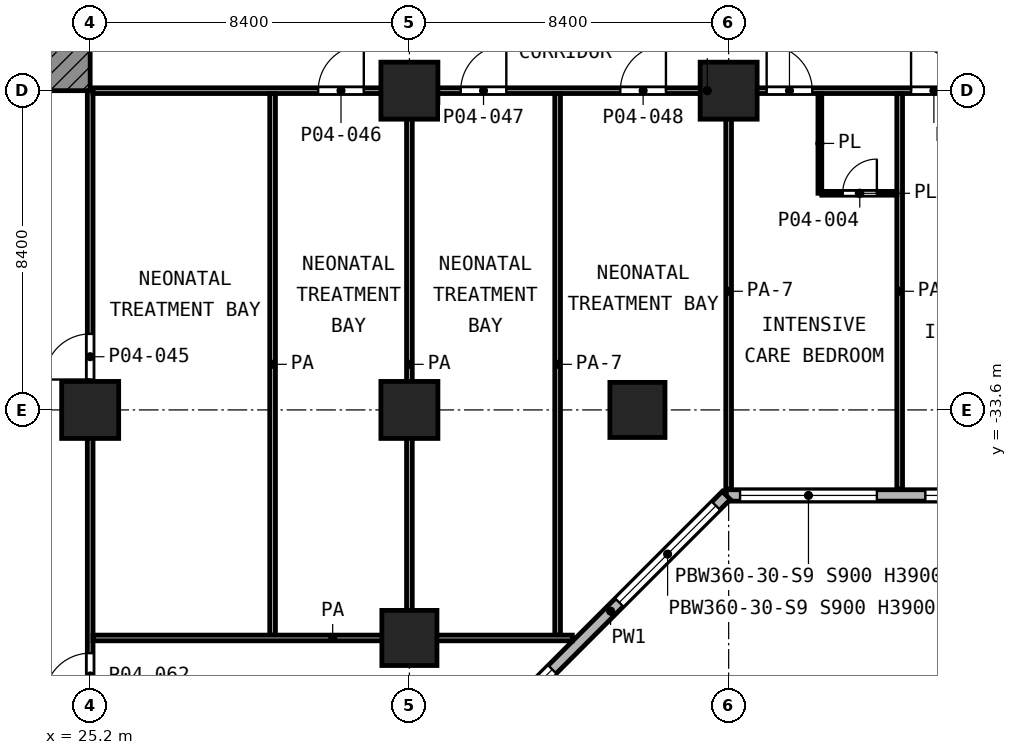
"""IFC4 building model, lengths in metres.
Left out: names, types, materials, properties, quantities, classifications, styles, units other than length and angle.
Written with IfcOpenShell. Run it as: python <this file> out.ifc"""

import sys

from ifc_helpers import new_model, si_unit, direction, frame, frame_2d, origin, origin_2d, place, context, subcontext, project, spatial, rectangle, extrude, element, fill, save


model = new_model("IFC4")
c1 = context("Model", 3, precision=1e-05, world=origin(), true_north=direction((0.0, 1.0)))
c2 = subcontext(c1, "Body", "Model", "MODEL_VIEW")
j1 = project(units=[si_unit("LENGTHUNIT", "METRE"), si_unit("PLANEANGLEUNIT", "RADIAN")], contexts=[c1])
p1 = place(None, origin())
s1 = spatial("IfcSite", under=j1, at=p1, CompositionType="ELEMENT")
p2 = place(p1, origin())
s2 = spatial("IfcBuilding", under=s1, at=p2, CompositionType="ELEMENT")
p3 = place(p2, frame((0.0, 0.0, 18.2)))
s3 = spatial("IfcBuildingStorey", under=s2, at=p3, CompositionType="ELEMENT", Elevation=18.2)
for number, where, z_axis, x_axis in (
    (1, (33.6, -25.2, 0.0), (0.0, 0.0, 1.0), (1.0, 0.0, 0.0)),
    (2, (42.0, -25.2, 0.0), (0.0, 0.0, 1.0), (1.0, 0.0, 0.0)),
    (3, (25.2, -33.6, 0.0), (0.0, 0.0, 1.0), (1.0, 0.0, 0.0)),
    (4, (33.6, -33.6, 0.0), (0.0, 0.0, 1.0), (1.0, 0.0, 0.0)),
):
    element("IfcColumn", number, at=place(p3, frame(where, z_axis=z_axis, x_axis=x_axis)), inside=s3, PredefinedType="COLUMN", context=c2, shape_type="SweptSolid", body=[
        extrude(rectangle(XDim=1.5, YDim=1.5, at=origin_2d()), origin(), (0.0, 0.0, 1.0), 5.6),
    ])
for number, where, z_axis, x_axis in (
    (5, (39.6, -33.6, 0.0), (0.0, 0.0, 1.0), (1.0, 0.0, 0.0)),
    (6, (33.6, -39.6, 0.0), (0.0, 0.0, 1.0), (1.0, 0.0, 0.0)),
):
    element("IfcColumn", number, at=place(p3, frame(where, z_axis=z_axis, x_axis=x_axis)), inside=s3, PredefinedType="COLUMN", context=c2, shape_type="SweptSolid", body=[
        extrude(rectangle(XDim=1.45, YDim=1.45, at=origin_2d()), origin(), (0.0, 0.0, 1.0), 5.6),
    ])
p4 = place(p3, frame((35.85, -41.938, 0.0), z_axis=(0.0, 0.0, 1.0), x_axis=(0.707106781187, 0.707106781187, 0.0)))
e7 = element("IfcWall", 7, at=p4, inside=s3, PredefinedType="SOLIDWALL", context=c2, shape_type="SweptSolid", body=[
    extrude(rectangle(XDim=8.61, YDim=0.3, at=frame_2d((4.305, 0.0))), origin(), (0.0, 0.0, 1.0), 5.05),
])
p5 = place(p4, frame((0.934, 0.0, 0.9)))
e8 = element("IfcOpeningElement", 8, at=p5, cuts=e7, PredefinedType="OPENING", context=c2, shape_type="SweptSolid", body=[
    extrude(rectangle(XDim=1.2, YDim=3.0, at=frame_2d((0.6, 1.5))), frame((0.0, 0.16, 0.0), z_axis=(0.0, -1.0, 0.0), x_axis=(1.0, 0.0, 0.0)), (0.0, 0.0, 1.0), 0.32),
])
p6 = place(p4, frame((4.626, 0.0, 0.9)))
e9 = element("IfcOpeningElement", 9, at=p6, cuts=e7, PredefinedType="OPENING", context=c2, shape_type="SweptSolid", body=[
    extrude(rectangle(XDim=3.6, YDim=3.0, at=frame_2d((1.8, 1.5))), frame((0.0, 0.16, 0.0), z_axis=(0.0, -1.0, 0.0), x_axis=(1.0, 0.0, 0.0)), (0.0, 0.0, 1.0), 0.32),
])
p7 = place(p3, frame((41.938, -35.85, 0.0), z_axis=(0.0, 0.0, 1.0), x_axis=(1.0, 0.0, 0.0)))
e10 = element("IfcWall", 10, at=p7, inside=s3, PredefinedType="SOLIDWALL", context=c2, shape_type="SweptSolid", body=[
    extrude(rectangle(XDim=17.912, YDim=0.3, at=frame_2d((8.956, 0.0))), origin(), (0.0, 0.0, 1.0), 5.05),
])
p8 = place(p7, frame((0.362, 0.0, 0.9)))
e11 = element("IfcOpeningElement", 11, at=p8, cuts=e10, PredefinedType="OPENING", context=c2, shape_type="SweptSolid", body=[
    extrude(rectangle(XDim=3.6, YDim=3.0, at=frame_2d((1.8, 1.5))), frame((0.0, 0.16, 0.0), z_axis=(0.0, -1.0, 0.0), x_axis=(1.0, 0.0, 0.0)), (0.0, 0.0, 1.0), 0.32),
])
p9 = place(p7, frame((5.237, 0.0, 0.9)))
e12 = element("IfcOpeningElement", 12, at=p9, cuts=e10, PredefinedType="OPENING", context=c2, shape_type="SweptSolid", body=[
    extrude(rectangle(XDim=2.4, YDim=3.0, at=frame_2d((1.2, 1.5))), frame((0.0, 0.16, 0.0), z_axis=(0.0, -1.0, 0.0), x_axis=(1.0, 0.0, 0.0)), (0.0, 0.0, 1.0), 0.32),
])
p10 = place(p7, frame((8.762, 0.0, 0.9)))
e13 = element("IfcOpeningElement", 13, at=p10, cuts=e10, PredefinedType="OPENING", context=c2, shape_type="SweptSolid", body=[
    extrude(rectangle(XDim=3.6, YDim=3.0, at=frame_2d((1.8, 1.5))), frame((0.0, 0.16, 0.0), z_axis=(0.0, -1.0, 0.0), x_axis=(1.0, 0.0, 0.0)), (0.0, 0.0, 1.0), 0.32),
])
p11 = place(p7, frame((12.962, 0.0, 0.9)))
e14 = element("IfcOpeningElement", 14, at=p11, cuts=e10, PredefinedType="OPENING", context=c2, shape_type="SweptSolid", body=[
    extrude(rectangle(XDim=3.6, YDim=3.0, at=frame_2d((1.8, 1.5))), frame((0.0, 0.16, 0.0), z_axis=(0.0, -1.0, 0.0), x_axis=(1.0, 0.0, 0.0)), (0.0, 0.0, 1.0), 0.32),
])
p12 = place(p3, frame((24.6, -25.2, 0.0), z_axis=(0.0, 0.0, 1.0), x_axis=(0.0, 1.0, 0.0)))
e15 = element("IfcWall", 15, at=p12, inside=s3, PredefinedType="SHEAR", context=c2, shape_type="SweptSolid", body=[
    extrude(rectangle(XDim=1.2, YDim=1.2, at=frame_2d((0.6, 0.0))), origin(), (0.0, 0.0, 1.0), 5.05),
])
p13 = place(p3, frame((44.45, -27.9, 0.0), z_axis=(0.0, 0.0, 1.0), x_axis=(1.0, 0.0, 0.0)))
e16 = element("IfcWall", 16, at=p13, inside=s3, PredefinedType="PARTITIONING", context=c2, shape_type="SweptSolid", body=[
    extrude(rectangle(XDim=1.975, YDim=0.1, at=frame_2d((0.988, 0.0))), origin(), (0.0, 0.0, 1.0), 5.05),
])
p14 = place(p13, frame((0.55, 0.0, 0.0)))
e17 = element("IfcOpeningElement", 17, at=p14, cuts=e16, PredefinedType="OPENING", context=c2, shape_type="SweptSolid", body=[
    extrude(rectangle(XDim=0.9, YDim=2.1, at=frame_2d((0.45, 1.05))), frame((0.0, 0.06, 0.0), z_axis=(0.0, -1.0, 0.0), x_axis=(1.0, 0.0, 0.0)), (0.0, 0.0, 1.0), 0.12),
])
p15 = place(p3, frame((44.4, -27.9, 0.0), z_axis=(0.0, 0.0, 1.0), x_axis=(0.0, 1.0, 0.0)))
e18 = element("IfcWall", 18, at=p15, inside=s3, PredefinedType="PARTITIONING", context=c2, shape_type="SweptSolid", body=[
    extrude(rectangle(XDim=2.625, YDim=0.1, at=frame_2d((1.312, 0.0))), origin(), (0.0, 0.0, 1.0), 5.05),
])
p16 = place(p3, frame((25.275, -39.6, 0.0), z_axis=(0.0, 0.0, 1.0), x_axis=(1.0, 0.0, 0.0)))
e19 = element("IfcWall", 19, at=p16, inside=s3, PredefinedType="PARTITIONING", context=c2, shape_type="SweptSolid", body=[
    extrude(rectangle(XDim=12.612, YDim=0.15, at=frame_2d((6.306, 0.0))), origin(), (0.0, 0.0, 1.0), 5.05),
])
p17 = place(p3, frame((25.275, -25.2, 0.0), z_axis=(0.0, 0.0, 1.0), x_axis=(1.0, 0.0, 0.0)))
e20 = element("IfcWall", 20, at=p17, inside=s3, PredefinedType="PARTITIONING", context=c2, shape_type="SweptSolid", body=[
    extrude(rectangle(XDim=32.325, YDim=0.15, at=frame_2d((16.163, 0.0))), origin(), (0.0, 0.0, 1.0), 5.05),
])
p18 = place(p17, frame((5.925, 0.0, 0.0)))
e21 = element("IfcOpeningElement", 21, at=p18, cuts=e20, PredefinedType="OPENING", context=c2, shape_type="SweptSolid", body=[
    extrude(rectangle(XDim=1.2, YDim=2.1, at=frame_2d((0.6, 1.05))), frame((0.0, 0.085, 0.0), z_axis=(0.0, -1.0, 0.0), x_axis=(1.0, 0.0, 0.0)), (0.0, 0.0, 1.0), 0.17),
])
p19 = place(p17, frame((9.675, 0.0, 0.0)))
e22 = element("IfcOpeningElement", 22, at=p19, cuts=e20, PredefinedType="OPENING", context=c2, shape_type="SweptSolid", body=[
    extrude(rectangle(XDim=1.2, YDim=2.1, at=frame_2d((0.6, 1.05))), frame((0.0, 0.085, 0.0), z_axis=(0.0, -1.0, 0.0), x_axis=(1.0, 0.0, 0.0)), (0.0, 0.0, 1.0), 0.17),
])
p20 = place(p17, frame((13.875, 0.0, 0.0)))
e23 = element("IfcOpeningElement", 23, at=p20, cuts=e20, PredefinedType="OPENING", context=c2, shape_type="SweptSolid", body=[
    extrude(rectangle(XDim=1.2, YDim=2.1, at=frame_2d((0.6, 1.05))), frame((0.0, 0.085, 0.0), z_axis=(0.0, -1.0, 0.0), x_axis=(1.0, 0.0, 0.0)), (0.0, 0.0, 1.0), 0.17),
])
p21 = place(p17, frame((17.725, 0.0, 0.0)))
e24 = element("IfcOpeningElement", 24, at=p21, cuts=e20, PredefinedType="OPENING", context=c2, shape_type="SweptSolid", body=[
    extrude(rectangle(XDim=1.2, YDim=2.1, at=frame_2d((0.6, 1.05))), frame((0.0, 0.085, 0.0), z_axis=(0.0, -1.0, 0.0), x_axis=(1.0, 0.0, 0.0)), (0.0, 0.0, 1.0), 0.17),
])
p22 = place(p17, frame((23.125, 0.0, 0.0)))
e25 = element("IfcOpeningElement", 25, at=p22, cuts=e20, PredefinedType="OPENING", context=c2, shape_type="SweptSolid", body=[
    extrude(rectangle(XDim=1.2, YDim=2.1, at=frame_2d((0.6, 1.05))), frame((0.0, 0.085, 0.0), z_axis=(0.0, -1.0, 0.0), x_axis=(1.0, 0.0, 0.0)), (0.0, 0.0, 1.0), 0.17),
])
p23 = place(p17, frame((21.525, 0.0, 0.0)))
e26 = element("IfcOpeningElement", 26, at=p23, cuts=e20, PredefinedType="OPENING", context=c2, shape_type="SweptSolid", body=[
    extrude(rectangle(XDim=1.2, YDim=2.1, at=frame_2d((0.6, 1.05))), frame((0.0, 0.085, 0.0), z_axis=(0.0, -1.0, 0.0), x_axis=(1.0, 0.0, 0.0)), (0.0, 0.0, 1.0), 0.17),
])
p24 = place(p3, frame((25.2, -81.3, 0.0), z_axis=(0.0, 0.0, 1.0), x_axis=(0.0, 1.0, 0.0)))
e27 = element("IfcWall", 27, at=p24, inside=s3, PredefinedType="PARTITIONING", context=c2, shape_type="SweptSolid", body=[
    extrude(rectangle(XDim=56.1, YDim=0.15, at=frame_2d((28.05, 0.0))), origin(), (0.0, 0.0, 1.0), 5.05),
])
p25 = place(p24, frame((48.5, 0.0, 0.0)))
e28 = element("IfcOpeningElement", 28, at=p25, cuts=e27, PredefinedType="OPENING", context=c2, shape_type="SweptSolid", body=[
    extrude(rectangle(XDim=1.2, YDim=2.1, at=frame_2d((0.6, 1.05))), frame((0.0, 0.085, 0.0), z_axis=(0.0, -1.0, 0.0), x_axis=(1.0, 0.0, 0.0)), (0.0, 0.0, 1.0), 0.17),
])
p26 = place(p24, frame((40.1, 0.0, 0.0)))
e29 = element("IfcOpeningElement", 29, at=p26, cuts=e27, PredefinedType="OPENING", context=c2, shape_type="SweptSolid", body=[
    extrude(rectangle(XDim=1.2, YDim=2.1, at=frame_2d((0.6, 1.05))), frame((0.0, 0.085, 0.0), z_axis=(0.0, -1.0, 0.0), x_axis=(1.0, 0.0, 0.0)), (0.0, 0.0, 1.0), 0.17),
])
p27 = place(p24, frame((37.3, 0.0, 0.0)))
e30 = element("IfcOpeningElement", 30, at=p27, cuts=e27, PredefinedType="OPENING", context=c2, shape_type="SweptSolid", body=[
    extrude(rectangle(XDim=1.2, YDim=2.1, at=frame_2d((0.6, 1.05))), frame((0.0, 0.085, 0.0), z_axis=(0.0, -1.0, 0.0), x_axis=(1.0, 0.0, 0.0)), (0.0, 0.0, 1.0), 0.17),
])
p28 = place(p24, frame((28.9, 0.0, 0.0)))
e31 = element("IfcOpeningElement", 31, at=p28, cuts=e27, PredefinedType="OPENING", context=c2, shape_type="SweptSolid", body=[
    extrude(rectangle(XDim=1.2, YDim=2.1, at=frame_2d((0.6, 1.05))), frame((0.0, 0.085, 0.0), z_axis=(0.0, -1.0, 0.0), x_axis=(1.0, 0.0, 0.0)), (0.0, 0.0, 1.0), 0.17),
])
p29 = place(p24, frame((23.3, 0.0, 0.0)))
e32 = element("IfcOpeningElement", 32, at=p29, cuts=e27, PredefinedType="OPENING", context=c2, shape_type="SweptSolid", body=[
    extrude(rectangle(XDim=1.2, YDim=2.1, at=frame_2d((0.6, 1.05))), frame((0.0, 0.085, 0.0), z_axis=(0.0, -1.0, 0.0), x_axis=(1.0, 0.0, 0.0)), (0.0, 0.0, 1.0), 0.17),
])
p30 = place(p24, frame((20.6, 0.0, 0.0)))
e33 = element("IfcOpeningElement", 33, at=p30, cuts=e27, PredefinedType="OPENING", context=c2, shape_type="SweptSolid", body=[
    extrude(rectangle(XDim=1.1, YDim=2.1, at=frame_2d((0.55, 1.05))), frame((0.0, 0.085, 0.0), z_axis=(0.0, -1.0, 0.0), x_axis=(1.0, 0.0, 0.0)), (0.0, 0.0, 1.0), 0.17),
])
p31 = place(p24, frame((14.9, 0.0, 0.0)))
e34 = element("IfcOpeningElement", 34, at=p31, cuts=e27, PredefinedType="OPENING", context=c2, shape_type="SweptSolid", body=[
    extrude(rectangle(XDim=1.1, YDim=2.1, at=frame_2d((0.55, 1.05))), frame((0.0, 0.085, 0.0), z_axis=(0.0, -1.0, 0.0), x_axis=(1.0, 0.0, 0.0)), (0.0, 0.0, 1.0), 0.17),
])
p32 = place(p24, frame((7.5, 0.0, 0.0)))
e35 = element("IfcOpeningElement", 35, at=p32, cuts=e27, PredefinedType="OPENING", context=c2, shape_type="SweptSolid", body=[
    extrude(rectangle(XDim=1.2, YDim=2.1, at=frame_2d((0.6, 1.05))), frame((0.0, 0.085, 0.0), z_axis=(0.0, -1.0, 0.0), x_axis=(1.0, 0.0, 0.0)), (0.0, 0.0, 1.0), 0.17),
])
p33 = place(p24, frame((11.7, 0.0, 0.0)))
e36 = element("IfcOpeningElement", 36, at=p33, cuts=e27, PredefinedType="OPENING", context=c2, shape_type="SweptSolid", body=[
    extrude(rectangle(XDim=1.2, YDim=2.1, at=frame_2d((0.6, 1.05))), frame((0.0, 0.085, 0.0), z_axis=(0.0, -1.0, 0.0), x_axis=(1.0, 0.0, 0.0)), (0.0, 0.0, 1.0), 0.17),
])
p34 = place(p24, frame((3.15, 0.0, 0.0)))
e37 = element("IfcOpeningElement", 37, at=p34, cuts=e27, PredefinedType="OPENING", context=c2, shape_type="SweptSolid", body=[
    extrude(rectangle(XDim=1.2, YDim=2.1, at=frame_2d((0.6, 1.05))), frame((0.0, 0.085, 0.0), z_axis=(0.0, -1.0, 0.0), x_axis=(1.0, 0.0, 0.0)), (0.0, 0.0, 1.0), 0.17),
])
for number, where, z_axis, x_axis in (
    (38, (30.0, -39.525, 0.0), (0.0, 0.0, 1.0), (0.0, 1.0, 0.0)),
    (39, (33.6, -39.525, 0.0), (0.0, 0.0, 1.0), (0.0, 1.0, 0.0)),
):
    element("IfcWall", number, at=place(p3, frame(where, z_axis=z_axis, x_axis=x_axis)), inside=s3, PredefinedType="PARTITIONING", context=c2, shape_type="SweptSolid", body=[
        extrude(rectangle(XDim=14.25, YDim=0.15, at=frame_2d((7.125, 0.0))), origin(), (0.0, 0.0, 1.0), 5.05),
    ])
p35 = place(p3, frame((37.5, -39.525, 0.0), z_axis=(0.0, 0.0, 1.0), x_axis=(0.0, 1.0, 0.0)))
e40 = element("IfcWall", 40, at=p35, inside=s3, PredefinedType="PARTITIONING", context=c2, shape_type="SweptSolid", body=[
    extrude(rectangle(XDim=14.25, YDim=0.15, at=frame_2d((7.125, 0.0))), origin(), (0.0, 0.0, 1.0), 3.65),
])
for number, where, z_axis, x_axis in (
    (41, (42.0, -35.68, 0.0), (0.0, 0.0, 1.0), (0.0, 1.0, 0.0)),
    (42, (46.5, -35.68, 0.0), (0.0, 0.0, 1.0), (0.0, 1.0, 0.0)),
):
    element("IfcWall", number, at=place(p3, frame(where, z_axis=z_axis, x_axis=x_axis)), inside=s3, PredefinedType="PARTITIONING", context=c2, shape_type="SweptSolid", body=[
        extrude(rectangle(XDim=10.405, YDim=0.15, at=frame_2d((5.203, 0.0))), origin(), (0.0, 0.0, 1.0), 3.65),
    ])
p36 = place(p5, origin())
e43 = element("IfcWindow", 43, at=p36, inside=s3, PartitioningType="SINGLE_PANEL", PredefinedType="WINDOW", context=c2, shape_type="SweptSolid", body=[
    extrude(rectangle(XDim=1.2, YDim=3.0, at=frame_2d((0.6, 1.5))), frame((0.0, 0.03, 0.0), z_axis=(0.0, -1.0, 0.0), x_axis=(1.0, 0.0, 0.0)), (0.0, 0.0, 1.0), 0.06),
])
fill(e8, e43)
p37 = place(p6, origin())
e44 = element("IfcWindow", 44, at=p37, inside=s3, PartitioningType="SINGLE_PANEL", PredefinedType="WINDOW", context=c2, shape_type="SweptSolid", body=[
    extrude(rectangle(XDim=3.6, YDim=3.0, at=frame_2d((1.8, 1.5))), frame((0.0, 0.03, 0.0), z_axis=(0.0, -1.0, 0.0), x_axis=(1.0, 0.0, 0.0)), (0.0, 0.0, 1.0), 0.06),
])
fill(e9, e44)
p38 = place(p8, origin())
e45 = element("IfcWindow", 45, at=p38, inside=s3, PartitioningType="SINGLE_PANEL", PredefinedType="WINDOW", context=c2, shape_type="SweptSolid", body=[
    extrude(rectangle(XDim=3.6, YDim=3.0, at=frame_2d((1.8, 1.5))), frame((0.0, 0.03, 0.0), z_axis=(0.0, -1.0, 0.0), x_axis=(1.0, 0.0, 0.0)), (0.0, 0.0, 1.0), 0.06),
])
fill(e11, e45)
p39 = place(p9, origin())
e46 = element("IfcWindow", 46, at=p39, inside=s3, PartitioningType="SINGLE_PANEL", PredefinedType="WINDOW", context=c2, shape_type="SweptSolid", body=[
    extrude(rectangle(XDim=2.4, YDim=3.0, at=frame_2d((1.2, 1.5))), frame((0.0, 0.03, 0.0), z_axis=(0.0, -1.0, 0.0), x_axis=(1.0, 0.0, 0.0)), (0.0, 0.0, 1.0), 0.06),
])
fill(e12, e46)
p40 = place(p25, origin())
e47 = element("IfcDoor", 47, at=p40, inside=s3, OperationType="SINGLE_SWING_LEFT", PredefinedType="DOOR", context=c2, shape_type="SweptSolid", body=[
    extrude(rectangle(XDim=1.2, YDim=2.1, at=frame_2d((0.6, 1.05))), frame((0.0, 0.025, 0.0), z_axis=(0.0, -1.0, 0.0), x_axis=(1.0, 0.0, 0.0)), (0.0, 0.0, 1.0), 0.05),
])
fill(e28, e47)
p41 = place(p18, origin())
e48 = element("IfcDoor", 48, at=p41, inside=s3, OperationType="SINGLE_SWING_RIGHT", PredefinedType="DOOR", context=c2, shape_type="SweptSolid", body=[
    extrude(rectangle(XDim=1.2, YDim=2.1, at=frame_2d((0.6, 1.05))), frame((0.0, 0.025, 0.0), z_axis=(0.0, -1.0, 0.0), x_axis=(1.0, 0.0, 0.0)), (0.0, 0.0, 1.0), 0.05),
])
fill(e21, e48)
p42 = place(p19, origin())
e49 = element("IfcDoor", 49, at=p42, inside=s3, OperationType="SINGLE_SWING_RIGHT", PredefinedType="DOOR", context=c2, shape_type="SweptSolid", body=[
    extrude(rectangle(XDim=1.2, YDim=2.1, at=frame_2d((0.6, 1.05))), frame((0.0, 0.025, 0.0), z_axis=(0.0, -1.0, 0.0), x_axis=(1.0, 0.0, 0.0)), (0.0, 0.0, 1.0), 0.05),
])
fill(e22, e49)
p43 = place(p20, origin())
e50 = element("IfcDoor", 50, at=p43, inside=s3, OperationType="SINGLE_SWING_RIGHT", PredefinedType="DOOR", context=c2, shape_type="SweptSolid", body=[
    extrude(rectangle(XDim=1.2, YDim=2.1, at=frame_2d((0.6, 1.05))), frame((0.0, 0.025, 0.0), z_axis=(0.0, -1.0, 0.0), x_axis=(1.0, 0.0, 0.0)), (0.0, 0.0, 1.0), 0.05),
])
fill(e23, e50)
p44 = place(p21, origin())
e51 = element("IfcDoor", 51, at=p44, inside=s3, OperationType="SINGLE_SWING_LEFT", PredefinedType="DOOR", context=c2, shape_type="SweptSolid", body=[
    extrude(rectangle(XDim=1.2, YDim=2.1, at=frame_2d((0.6, 1.05))), frame((0.0, 0.025, 0.0), z_axis=(0.0, -1.0, 0.0), x_axis=(1.0, 0.0, 0.0)), (0.0, 0.0, 1.0), 0.05),
])
fill(e24, e51)
p45 = place(p14, origin())
e52 = element("IfcDoor", 52, at=p45, inside=s3, OperationType="SINGLE_SWING_RIGHT", PredefinedType="DOOR", context=c2, shape_type="SweptSolid", body=[
    extrude(rectangle(XDim=0.9, YDim=2.1, at=frame_2d((0.45, 1.05))), frame((0.0, 0.025, 0.0), z_axis=(0.0, -1.0, 0.0), x_axis=(1.0, 0.0, 0.0)), (0.0, 0.0, 1.0), 0.05),
])
fill(e17, e52)
p46 = place(p23, origin())
e53 = element("IfcDoor", 53, at=p46, inside=s3, OperationType="SINGLE_SWING_LEFT", PredefinedType="DOOR", context=c2, shape_type="SweptSolid", body=[
    extrude(rectangle(XDim=1.2, YDim=2.1, at=frame_2d((0.6, 1.05))), frame((0.0, 0.025, 0.0), z_axis=(0.0, -1.0, 0.0), x_axis=(1.0, 0.0, 0.0)), (0.0, 0.0, 1.0), 0.05),
])
fill(e26, e53)
p47 = place(p26, origin())
e54 = element("IfcDoor", 54, at=p47, inside=s3, OperationType="SINGLE_SWING_LEFT", PredefinedType="DOOR", context=c2, shape_type="SweptSolid", body=[
    extrude(rectangle(XDim=1.2, YDim=2.1, at=frame_2d((0.6, 1.05))), frame((0.0, 0.025, 0.0), z_axis=(0.0, -1.0, 0.0), x_axis=(1.0, 0.0, 0.0)), (0.0, 0.0, 1.0), 0.05),
])
fill(e29, e54)
save(model, sys.argv[1])
